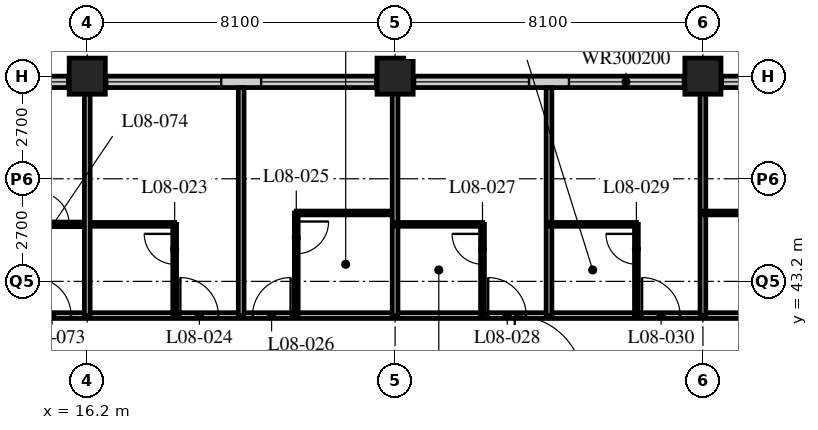
"""IFC4 building model, lengths in metres.
Left out: names, types, materials, properties, quantities, classifications, styles, units other than length and angle.
Written with IfcOpenShell. Run it as: python <this file> out.ifc"""

import sys

from ifc_helpers import new_model, si_unit, direction, frame, frame_2d, origin, origin_2d, place, context, subcontext, project, spatial, rectangle, hollow_rectangle, extrude, element, fill, save


model = new_model("IFC4")
c1 = context("Model", 3, precision=1e-05, world=origin(), true_north=direction((0.0, 1.0)))
c2 = subcontext(c1, "Body", "Model", "MODEL_VIEW")
j1 = project(units=[si_unit("LENGTHUNIT", "METRE"), si_unit("PLANEANGLEUNIT", "RADIAN")], contexts=[c1])
p1 = place(None, origin())
s1 = spatial("IfcSite", under=j1, at=p1, CompositionType="ELEMENT")
p2 = place(p1, origin())
s2 = spatial("IfcBuilding", under=s1, at=p2, CompositionType="ELEMENT")
p3 = place(p2, frame((0.0, 0.0, 39.8)))
s3 = spatial("IfcBuildingStorey", under=s2, at=p3, CompositionType="ELEMENT", Elevation=39.8)
for number, where, z_axis, x_axis in (
    (1, (16.2, 48.6, 0.0), (0.0, 0.0, 1.0), (1.0, 0.0, 0.0)),
    (2, (24.3, 48.6, 0.0), (0.0, 0.0, 1.0), (1.0, 0.0, 0.0)),
    (3, (32.4, 48.6, 0.0), (0.0, 0.0, 1.0), (1.0, 0.0, 0.0)),
):
    element("IfcColumn", number, at=place(p3, frame(where, z_axis=z_axis, x_axis=x_axis)), inside=s3, PredefinedType="COLUMN", context=c2, shape_type="SweptSolid", body=[
        extrude(hollow_rectangle(XDim=0.95, YDim=0.95, WallThickness=0.095, at=origin_2d()), origin(), (0.0, 0.0, 1.0), 3.4),
    ])
p4 = place(p3, frame((48.3, 48.45, 0.0), z_axis=(0.0, 0.0, 1.0), x_axis=(-1.0, 0.0, 0.0)))
e4 = element("IfcWall", 4, at=p4, inside=s3, PredefinedType="SOLIDWALL", context=c2, shape_type="SweptSolid", body=[
    extrude(rectangle(XDim=40.2, YDim=0.3, at=frame_2d((20.1, 0.0))), origin(), (0.0, 0.0, 1.0), 3.19),
])
p5 = place(p4, frame((0.225, 0.0, 0.9)))
e5 = element("IfcOpeningElement", 5, at=p5, cuts=e4, PredefinedType="OPENING", context=c2, shape_type="SweptSolid", body=[
    extrude(rectangle(XDim=3.0, YDim=2.0, at=frame_2d((1.5, 1.0))), frame((0.0, 0.16, 0.0), z_axis=(0.0, -1.0, 0.0), x_axis=(1.0, 0.0, 0.0)), (0.0, 0.0, 1.0), 0.32),
])
p6 = place(p4, frame((4.275, 0.0, 0.9)))
e6 = element("IfcOpeningElement", 6, at=p6, cuts=e4, PredefinedType="OPENING", context=c2, shape_type="SweptSolid", body=[
    extrude(rectangle(XDim=3.0, YDim=2.0, at=frame_2d((1.5, 1.0))), frame((0.0, 0.16, 0.0), z_axis=(0.0, -1.0, 0.0), x_axis=(1.0, 0.0, 0.0)), (0.0, 0.0, 1.0), 0.32),
])
p7 = place(p4, frame((8.325, 0.0, 0.9)))
e7 = element("IfcOpeningElement", 7, at=p7, cuts=e4, PredefinedType="OPENING", context=c2, shape_type="SweptSolid", body=[
    extrude(rectangle(XDim=3.0, YDim=2.0, at=frame_2d((1.5, 1.0))), frame((0.0, 0.16, 0.0), z_axis=(0.0, -1.0, 0.0), x_axis=(1.0, 0.0, 0.0)), (0.0, 0.0, 1.0), 0.32),
])
p8 = place(p4, frame((12.375, 0.0, 0.9)))
e8 = element("IfcOpeningElement", 8, at=p8, cuts=e4, PredefinedType="OPENING", context=c2, shape_type="SweptSolid", body=[
    extrude(rectangle(XDim=3.0, YDim=2.0, at=frame_2d((1.5, 1.0))), frame((0.0, 0.16, 0.0), z_axis=(0.0, -1.0, 0.0), x_axis=(1.0, 0.0, 0.0)), (0.0, 0.0, 1.0), 0.32),
])
p9 = place(p4, frame((16.425, 0.0, 0.9)))
e9 = element("IfcOpeningElement", 9, at=p9, cuts=e4, PredefinedType="OPENING", context=c2, shape_type="SweptSolid", body=[
    extrude(rectangle(XDim=3.0, YDim=2.0, at=frame_2d((1.5, 1.0))), frame((0.0, 0.16, 0.0), z_axis=(0.0, -1.0, 0.0), x_axis=(1.0, 0.0, 0.0)), (0.0, 0.0, 1.0), 0.32),
])
p10 = place(p4, frame((20.475, 0.0, 0.9)))
e10 = element("IfcOpeningElement", 10, at=p10, cuts=e4, PredefinedType="OPENING", context=c2, shape_type="SweptSolid", body=[
    extrude(rectangle(XDim=3.0, YDim=2.0, at=frame_2d((1.5, 1.0))), frame((0.0, 0.16, 0.0), z_axis=(0.0, -1.0, 0.0), x_axis=(1.0, 0.0, 0.0)), (0.0, 0.0, 1.0), 0.32),
])
p11 = place(p4, frame((24.525, 0.0, 0.9)))
e11 = element("IfcOpeningElement", 11, at=p11, cuts=e4, PredefinedType="OPENING", context=c2, shape_type="SweptSolid", body=[
    extrude(rectangle(XDim=3.0, YDim=2.0, at=frame_2d((1.5, 1.0))), frame((0.0, 0.16, 0.0), z_axis=(0.0, -1.0, 0.0), x_axis=(1.0, 0.0, 0.0)), (0.0, 0.0, 1.0), 0.32),
])
p12 = place(p4, frame((28.575, 0.0, 0.9)))
e12 = element("IfcOpeningElement", 12, at=p12, cuts=e4, PredefinedType="OPENING", context=c2, shape_type="SweptSolid", body=[
    extrude(rectangle(XDim=3.0, YDim=2.0, at=frame_2d((1.5, 1.0))), frame((0.0, 0.16, 0.0), z_axis=(0.0, -1.0, 0.0), x_axis=(1.0, 0.0, 0.0)), (0.0, 0.0, 1.0), 0.32),
])
p13 = place(p4, frame((32.625, 0.0, 0.9)))
e13 = element("IfcOpeningElement", 13, at=p13, cuts=e4, PredefinedType="OPENING", context=c2, shape_type="SweptSolid", body=[
    extrude(rectangle(XDim=3.0, YDim=2.0, at=frame_2d((1.5, 1.0))), frame((0.0, 0.16, 0.0), z_axis=(0.0, -1.0, 0.0), x_axis=(1.0, 0.0, 0.0)), (0.0, 0.0, 1.0), 0.32),
])
p14 = place(p4, frame((36.675, 0.0, 0.9)))
e14 = element("IfcOpeningElement", 14, at=p14, cuts=e4, PredefinedType="OPENING", context=c2, shape_type="SweptSolid", body=[
    extrude(rectangle(XDim=3.0, YDim=2.0, at=frame_2d((1.5, 1.0))), frame((0.0, 0.16, 0.0), z_axis=(0.0, -1.0, 0.0), x_axis=(1.0, 0.0, 0.0)), (0.0, 0.0, 1.0), 0.32),
])
p15 = place(p3, frame((12.15, 42.3, 0.0), z_axis=(0.0, 0.0, 1.0), x_axis=(1.0, 0.0, 0.0)))
e15 = element("IfcWall", 15, at=p15, inside=s3, PredefinedType="PARTITIONING", context=c2, shape_type="SweptSolid", body=[
    extrude(rectangle(XDim=32.4, YDim=0.15, at=frame_2d((16.2, 0.0))), origin(), (0.0, 0.0, 1.0), 3.19),
])
p16 = place(p15, frame((6.5, 0.0, 0.0)))
e16 = element("IfcOpeningElement", 16, at=p16, cuts=e15, PredefinedType="OPENING", context=c2, shape_type="SweptSolid", body=[
    extrude(rectangle(XDim=1.0, YDim=2.1, at=frame_2d((0.5, 1.05))), frame((0.0, 0.085, 0.0), z_axis=(0.0, -1.0, 0.0), x_axis=(1.0, 0.0, 0.0)), (0.0, 0.0, 1.0), 0.17),
])
p17 = place(p15, frame((8.4, 0.0, 0.0)))
e17 = element("IfcOpeningElement", 17, at=p17, cuts=e15, PredefinedType="OPENING", context=c2, shape_type="SweptSolid", body=[
    extrude(rectangle(XDim=1.0, YDim=2.1, at=frame_2d((0.5, 1.05))), frame((0.0, 0.085, 0.0), z_axis=(0.0, -1.0, 0.0), x_axis=(1.0, 0.0, 0.0)), (0.0, 0.0, 1.0), 0.17),
])
p18 = place(p15, frame((14.6, 0.0, 0.0)))
e18 = element("IfcOpeningElement", 18, at=p18, cuts=e15, PredefinedType="OPENING", context=c2, shape_type="SweptSolid", body=[
    extrude(rectangle(XDim=1.0, YDim=2.1, at=frame_2d((0.5, 1.05))), frame((0.0, 0.085, 0.0), z_axis=(0.0, -1.0, 0.0), x_axis=(1.0, 0.0, 0.0)), (0.0, 0.0, 1.0), 0.17),
])
p19 = place(p15, frame((18.65, 0.0, 0.0)))
e19 = element("IfcOpeningElement", 19, at=p19, cuts=e15, PredefinedType="OPENING", context=c2, shape_type="SweptSolid", body=[
    extrude(rectangle(XDim=1.0, YDim=2.1, at=frame_2d((0.5, 1.05))), frame((0.0, 0.085, 0.0), z_axis=(0.0, -1.0, 0.0), x_axis=(1.0, 0.0, 0.0)), (0.0, 0.0, 1.0), 0.17),
])
p20 = place(p15, frame((23.0, 0.0, 0.0)))
e20 = element("IfcOpeningElement", 20, at=p20, cuts=e15, PredefinedType="OPENING", context=c2, shape_type="SweptSolid", body=[
    extrude(rectangle(XDim=1.0, YDim=2.1, at=frame_2d((0.5, 1.05))), frame((0.0, 0.085, 0.0), z_axis=(0.0, -1.0, 0.0), x_axis=(1.0, 0.0, 0.0)), (0.0, 0.0, 1.0), 0.17),
])
p21 = place(p15, frame((26.75, 0.0, 0.0)))
e21 = element("IfcOpeningElement", 21, at=p21, cuts=e15, PredefinedType="OPENING", context=c2, shape_type="SweptSolid", body=[
    extrude(rectangle(XDim=1.0, YDim=2.1, at=frame_2d((0.5, 1.05))), frame((0.0, 0.085, 0.0), z_axis=(0.0, -1.0, 0.0), x_axis=(1.0, 0.0, 0.0)), (0.0, 0.0, 1.0), 0.17),
])
p22 = place(p15, frame((28.775, 0.0, 0.0)))
e22 = element("IfcOpeningElement", 22, at=p22, cuts=e15, PredefinedType="OPENING", context=c2, shape_type="SweptSolid", body=[
    extrude(rectangle(XDim=1.0, YDim=2.1, at=frame_2d((0.5, 1.05))), frame((0.0, 0.085, 0.0), z_axis=(0.0, -1.0, 0.0), x_axis=(1.0, 0.0, 0.0)), (0.0, 0.0, 1.0), 0.17),
])
p23 = place(p15, frame((2.625, 0.0, 0.0)))
e23 = element("IfcOpeningElement", 23, at=p23, cuts=e15, PredefinedType="OPENING", context=c2, shape_type="SweptSolid", body=[
    extrude(rectangle(XDim=1.0, YDim=2.1, at=frame_2d((0.5, 1.05))), frame((0.0, 0.085, 0.0), z_axis=(0.0, -1.0, 0.0), x_axis=(1.0, 0.0, 0.0)), (0.0, 0.0, 1.0), 0.17),
])
p24 = place(p3, frame((16.2, 44.7, 0.0), z_axis=(0.0, 0.0, 1.0), x_axis=(1.0, 0.0, 0.0)))
e24 = element("IfcWall", 24, at=p24, inside=s3, PredefinedType="PARTITIONING", context=c2, shape_type="SweptSolid", body=[
    extrude(rectangle(XDim=2.3, YDim=0.1, at=frame_2d((1.15, 0.0))), origin(), (0.0, 0.0, 1.0), 3.19),
])
p25 = place(p3, frame((18.5, 42.3, 0.0), z_axis=(0.0, 0.0, 1.0), x_axis=(0.0, 1.0, 0.0)))
e25 = element("IfcWall", 25, at=p25, inside=s3, PredefinedType="PARTITIONING", context=c2, shape_type="SweptSolid", body=[
    extrude(rectangle(XDim=2.4, YDim=0.1, at=frame_2d((1.2, 0.0))), origin(), (0.0, 0.0, 1.0), 3.19),
])
p26 = place(p25, frame((1.35, 0.0, 0.0)))
e26 = element("IfcOpeningElement", 26, at=p26, cuts=e25, PredefinedType="OPENING", context=c2, shape_type="SweptSolid", body=[
    extrude(rectangle(XDim=0.8, YDim=2.1, at=frame_2d((0.4, 1.05))), frame((0.0, 0.06, 0.0), z_axis=(0.0, -1.0, 0.0), x_axis=(1.0, 0.0, 0.0)), (0.0, 0.0, 1.0), 0.12),
])
p27 = place(p3, frame((20.25, 42.3, 0.0), z_axis=(0.0, 0.0, 1.0), x_axis=(0.0, 1.0, 0.0)))
e27 = element("IfcWall", 27, at=p27, inside=s3, PredefinedType="PARTITIONING", context=c2, shape_type="SweptSolid", body=[
    extrude(rectangle(XDim=6.0, YDim=0.15, at=frame_2d((3.0, 0.0))), origin(), (0.0, 0.0, 1.0), 3.19),
])
p28 = place(p3, frame((21.7, 45.0, 0.0), z_axis=(0.0, 0.0, 1.0), x_axis=(1.0, 0.0, 0.0)))
e28 = element("IfcWall", 28, at=p28, inside=s3, PredefinedType="PARTITIONING", context=c2, shape_type="SweptSolid", body=[
    extrude(rectangle(XDim=2.6, YDim=0.1, at=frame_2d((1.3, 0.0))), origin(), (0.0, 0.0, 1.0), 3.19),
])
p29 = place(p3, frame((21.7, 42.3, 0.0), z_axis=(0.0, 0.0, 1.0), x_axis=(0.0, 1.0, 0.0)))
e29 = element("IfcWall", 29, at=p29, inside=s3, PredefinedType="PARTITIONING", context=c2, shape_type="SweptSolid", body=[
    extrude(rectangle(XDim=2.7, YDim=0.1, at=frame_2d((1.35, 0.0))), origin(), (0.0, 0.0, 1.0), 3.19),
])
p30 = place(p29, frame((1.625, 0.0, 0.0)))
e30 = element("IfcOpeningElement", 30, at=p30, cuts=e29, PredefinedType="OPENING", context=c2, shape_type="SweptSolid", body=[
    extrude(rectangle(XDim=0.85, YDim=2.1, at=frame_2d((0.425, 1.05))), frame((0.0, 0.06, 0.0), z_axis=(0.0, -1.0, 0.0), x_axis=(1.0, 0.0, 0.0)), (0.0, 0.0, 1.0), 0.12),
])
p31 = place(p3, frame((24.3, 42.3, 0.0), z_axis=(0.0, 0.0, 1.0), x_axis=(0.0, 1.0, 0.0)))
e31 = element("IfcWall", 31, at=p31, inside=s3, PredefinedType="PARTITIONING", context=c2, shape_type="SweptSolid", body=[
    extrude(rectangle(XDim=6.0, YDim=0.15, at=frame_2d((3.0, 0.0))), origin(), (0.0, 0.0, 1.0), 2.578),
])
p32 = place(p3, frame((24.3, 44.7, 0.0), z_axis=(0.0, 0.0, 1.0), x_axis=(1.0, 0.0, 0.0)))
e32 = element("IfcWall", 32, at=p32, inside=s3, PredefinedType="PARTITIONING", context=c2, shape_type="SweptSolid", body=[
    extrude(rectangle(XDim=2.3, YDim=0.1, at=frame_2d((1.15, 0.0))), origin(), (0.0, 0.0, 1.0), 3.19),
])
p33 = place(p3, frame((26.6, 42.3, 0.0), z_axis=(0.0, 0.0, 1.0), x_axis=(0.0, 1.0, 0.0)))
e33 = element("IfcWall", 33, at=p33, inside=s3, PredefinedType="PARTITIONING", context=c2, shape_type="SweptSolid", body=[
    extrude(rectangle(XDim=2.4, YDim=0.1, at=frame_2d((1.2, 0.0))), origin(), (0.0, 0.0, 1.0), 3.19),
])
p34 = place(p33, frame((1.35, 0.0, 0.0)))
e34 = element("IfcOpeningElement", 34, at=p34, cuts=e33, PredefinedType="OPENING", context=c2, shape_type="SweptSolid", body=[
    extrude(rectangle(XDim=0.8, YDim=2.1, at=frame_2d((0.4, 1.05))), frame((0.0, 0.06, 0.0), z_axis=(0.0, -1.0, 0.0), x_axis=(1.0, 0.0, 0.0)), (0.0, 0.0, 1.0), 0.12),
])
p35 = place(p3, frame((28.35, 42.3, 0.0), z_axis=(0.0, 0.0, 1.0), x_axis=(0.0, 1.0, 0.0)))
e35 = element("IfcWall", 35, at=p35, inside=s3, PredefinedType="PARTITIONING", context=c2, shape_type="SweptSolid", body=[
    extrude(rectangle(XDim=6.0, YDim=0.15, at=frame_2d((3.0, 0.0))), origin(), (0.0, 0.0, 1.0), 3.19),
])
p36 = place(p3, frame((28.35, 44.7, 0.0), z_axis=(0.0, 0.0, 1.0), x_axis=(1.0, 0.0, 0.0)))
e36 = element("IfcWall", 36, at=p36, inside=s3, PredefinedType="PARTITIONING", context=c2, shape_type="SweptSolid", body=[
    extrude(rectangle(XDim=2.3, YDim=0.1, at=frame_2d((1.15, 0.0))), origin(), (0.0, 0.0, 1.0), 3.19),
])
p37 = place(p3, frame((30.65, 42.3, 0.0), z_axis=(0.0, 0.0, 1.0), x_axis=(0.0, 1.0, 0.0)))
e37 = element("IfcWall", 37, at=p37, inside=s3, PredefinedType="PARTITIONING", context=c2, shape_type="SweptSolid", body=[
    extrude(rectangle(XDim=2.4, YDim=0.1, at=frame_2d((1.2, 0.0))), origin(), (0.0, 0.0, 1.0), 3.19),
])
p38 = place(p37, frame((1.35, 0.0, 0.0)))
e38 = element("IfcOpeningElement", 38, at=p38, cuts=e37, PredefinedType="OPENING", context=c2, shape_type="SweptSolid", body=[
    extrude(rectangle(XDim=0.8, YDim=2.1, at=frame_2d((0.4, 1.05))), frame((0.0, 0.06, 0.0), z_axis=(0.0, -1.0, 0.0), x_axis=(1.0, 0.0, 0.0)), (0.0, 0.0, 1.0), 0.12),
])
p39 = place(p3, frame((32.4, 42.3, 0.0), z_axis=(0.0, 0.0, 1.0), x_axis=(0.0, 1.0, 0.0)))
e39 = element("IfcWall", 39, at=p39, inside=s3, PredefinedType="PARTITIONING", context=c2, shape_type="SweptSolid", body=[
    extrude(rectangle(XDim=6.0, YDim=0.15, at=frame_2d((3.0, 0.0))), origin(), (0.0, 0.0, 1.0), 2.578),
])
p40 = place(p3, frame((32.4, 45.0, 0.0), z_axis=(0.0, 0.0, 1.0), x_axis=(1.0, 0.0, 0.0)))
e40 = element("IfcWall", 40, at=p40, inside=s3, PredefinedType="PARTITIONING", context=c2, shape_type="SweptSolid", body=[
    extrude(rectangle(XDim=2.6, YDim=0.1, at=frame_2d((1.3, 0.0))), origin(), (0.0, 0.0, 1.0), 3.19),
])
p41 = place(p3, frame((12.15, 44.7, 0.0), z_axis=(0.0, 0.0, 1.0), x_axis=(1.0, 0.0, 0.0)))
e41 = element("IfcWall", 41, at=p41, inside=s3, PredefinedType="PARTITIONING", context=c2, shape_type="SweptSolid", body=[
    extrude(rectangle(XDim=4.05, YDim=0.12, at=frame_2d((2.025, 0.0))), origin(), (0.0, 0.0, 1.0), 3.19),
])
p42 = place(p41, frame((2.725, 0.0, 0.0)))
e42 = element("IfcOpeningElement", 42, at=p42, cuts=e41, PredefinedType="OPENING", context=c2, shape_type="SweptSolid", body=[
    extrude(rectangle(XDim=0.85, YDim=2.1, at=frame_2d((0.425, 1.05))), frame((0.0, 0.07, 0.0), z_axis=(0.0, -1.0, 0.0), x_axis=(1.0, 0.0, 0.0)), (0.0, 0.0, 1.0), 0.14),
])
p43 = place(p3, frame((16.2, 42.3, 0.0), z_axis=(0.0, 0.0, 1.0), x_axis=(0.0, 1.0, 0.0)))
e43 = element("IfcWall", 43, at=p43, inside=s3, PredefinedType="PARTITIONING", context=c2, shape_type="SweptSolid", body=[
    extrude(rectangle(XDim=6.0, YDim=0.15, at=frame_2d((3.0, 0.0))), origin(), (0.0, 0.0, 1.0), 2.578),
])
p44 = place(p8, origin())
e44 = element("IfcWindow", 44, at=p44, inside=s3, PartitioningType="SINGLE_PANEL", PredefinedType="WINDOW", context=c2, shape_type="SweptSolid", body=[
    extrude(rectangle(XDim=3.0, YDim=2.0, at=frame_2d((1.5, 1.0))), frame((0.0, 0.03, 0.0), z_axis=(0.0, -1.0, 0.0), x_axis=(1.0, 0.0, 0.0)), (0.0, 0.0, 1.0), 0.06),
])
fill(e8, e44)
p45 = place(p9, origin())
e45 = element("IfcWindow", 45, at=p45, inside=s3, PartitioningType="SINGLE_PANEL", PredefinedType="WINDOW", context=c2, shape_type="SweptSolid", body=[
    extrude(rectangle(XDim=3.0, YDim=2.0, at=frame_2d((1.5, 1.0))), frame((0.0, 0.03, 0.0), z_axis=(0.0, -1.0, 0.0), x_axis=(1.0, 0.0, 0.0)), (0.0, 0.0, 1.0), 0.06),
])
fill(e9, e45)
p46 = place(p10, origin())
e46 = element("IfcWindow", 46, at=p46, inside=s3, PartitioningType="SINGLE_PANEL", PredefinedType="WINDOW", context=c2, shape_type="SweptSolid", body=[
    extrude(rectangle(XDim=3.0, YDim=2.0, at=frame_2d((1.5, 1.0))), frame((0.0, 0.03, 0.0), z_axis=(0.0, -1.0, 0.0), x_axis=(1.0, 0.0, 0.0)), (0.0, 0.0, 1.0), 0.06),
])
fill(e10, e46)
p47 = place(p11, origin())
e47 = element("IfcWindow", 47, at=p47, inside=s3, PartitioningType="SINGLE_PANEL", PredefinedType="WINDOW", context=c2, shape_type="SweptSolid", body=[
    extrude(rectangle(XDim=3.0, YDim=2.0, at=frame_2d((1.5, 1.0))), frame((0.0, 0.03, 0.0), z_axis=(0.0, -1.0, 0.0), x_axis=(1.0, 0.0, 0.0)), (0.0, 0.0, 1.0), 0.06),
])
fill(e11, e47)
p48 = place(p12, origin())
e48 = element("IfcWindow", 48, at=p48, inside=s3, PartitioningType="SINGLE_PANEL", PredefinedType="WINDOW", context=c2, shape_type="SweptSolid", body=[
    extrude(rectangle(XDim=3.0, YDim=2.0, at=frame_2d((1.5, 1.0))), frame((0.0, 0.03, 0.0), z_axis=(0.0, -1.0, 0.0), x_axis=(1.0, 0.0, 0.0)), (0.0, 0.0, 1.0), 0.06),
])
fill(e12, e48)
p49 = place(p13, origin())
e49 = element("IfcWindow", 49, at=p49, inside=s3, PartitioningType="SINGLE_PANEL", PredefinedType="WINDOW", context=c2, shape_type="SweptSolid", body=[
    extrude(rectangle(XDim=3.0, YDim=2.0, at=frame_2d((1.5, 1.0))), frame((0.0, 0.03, 0.0), z_axis=(0.0, -1.0, 0.0), x_axis=(1.0, 0.0, 0.0)), (0.0, 0.0, 1.0), 0.06),
])
fill(e13, e49)
p50 = place(p26, origin())
e50 = element("IfcDoor", 50, at=p50, inside=s3, OperationType="SINGLE_SWING_RIGHT", PredefinedType="DOOR", context=c2, shape_type="SweptSolid", body=[
    extrude(rectangle(XDim=0.8, YDim=2.1, at=frame_2d((0.4, 1.05))), frame((0.0, 0.025, 0.0), z_axis=(0.0, -1.0, 0.0), x_axis=(1.0, 0.0, 0.0)), (0.0, 0.0, 1.0), 0.05),
])
fill(e26, e50)
p51 = place(p16, origin())
e51 = element("IfcDoor", 51, at=p51, inside=s3, OperationType="SINGLE_SWING_LEFT", PredefinedType="DOOR", context=c2, shape_type="SweptSolid", body=[
    extrude(rectangle(XDim=1.0, YDim=2.1, at=frame_2d((0.5, 1.05))), frame((0.0, 0.025, 0.0), z_axis=(0.0, -1.0, 0.0), x_axis=(1.0, 0.0, 0.0)), (0.0, 0.0, 1.0), 0.05),
])
fill(e16, e51)
p52 = place(p30, origin())
e52 = element("IfcDoor", 52, at=p52, inside=s3, OperationType="SINGLE_SWING_LEFT", PredefinedType="DOOR", context=c2, shape_type="SweptSolid", body=[
    extrude(rectangle(XDim=0.85, YDim=2.1, at=frame_2d((0.425, 1.05))), frame((0.0, 0.025, 0.0), z_axis=(0.0, -1.0, 0.0), x_axis=(1.0, 0.0, 0.0)), (0.0, 0.0, 1.0), 0.05),
])
fill(e30, e52)
p53 = place(p17, origin())
e53 = element("IfcDoor", 53, at=p53, inside=s3, OperationType="SINGLE_SWING_RIGHT", PredefinedType="DOOR", context=c2, shape_type="SweptSolid", body=[
    extrude(rectangle(XDim=1.0, YDim=2.1, at=frame_2d((0.5, 1.05))), frame((0.0, 0.025, 0.0), z_axis=(0.0, -1.0, 0.0), x_axis=(1.0, 0.0, 0.0)), (0.0, 0.0, 1.0), 0.05),
])
fill(e17, e53)
p54 = place(p34, origin())
e54 = element("IfcDoor", 54, at=p54, inside=s3, OperationType="SINGLE_SWING_RIGHT", PredefinedType="DOOR", context=c2, shape_type="SweptSolid", body=[
    extrude(rectangle(XDim=0.8, YDim=2.1, at=frame_2d((0.4, 1.05))), frame((0.0, 0.025, 0.0), z_axis=(0.0, -1.0, 0.0), x_axis=(1.0, 0.0, 0.0)), (0.0, 0.0, 1.0), 0.05),
])
fill(e34, e54)
p55 = place(p18, origin())
e55 = element("IfcDoor", 55, at=p55, inside=s3, OperationType="SINGLE_SWING_LEFT", PredefinedType="DOOR", context=c2, shape_type="SweptSolid", body=[
    extrude(rectangle(XDim=1.0, YDim=2.1, at=frame_2d((0.5, 1.05))), frame((0.0, 0.025, 0.0), z_axis=(0.0, -1.0, 0.0), x_axis=(1.0, 0.0, 0.0)), (0.0, 0.0, 1.0), 0.05),
])
fill(e18, e55)
p56 = place(p38, origin())
e56 = element("IfcDoor", 56, at=p56, inside=s3, OperationType="SINGLE_SWING_RIGHT", PredefinedType="DOOR", context=c2, shape_type="SweptSolid", body=[
    extrude(rectangle(XDim=0.8, YDim=2.1, at=frame_2d((0.4, 1.05))), frame((0.0, 0.025, 0.0), z_axis=(0.0, -1.0, 0.0), x_axis=(1.0, 0.0, 0.0)), (0.0, 0.0, 1.0), 0.05),
])
fill(e38, e56)
p57 = place(p19, origin())
e57 = element("IfcDoor", 57, at=p57, inside=s3, OperationType="SINGLE_SWING_LEFT", PredefinedType="DOOR", context=c2, shape_type="SweptSolid", body=[
    extrude(rectangle(XDim=1.0, YDim=2.1, at=frame_2d((0.5, 1.05))), frame((0.0, 0.025, 0.0), z_axis=(0.0, -1.0, 0.0), x_axis=(1.0, 0.0, 0.0)), (0.0, 0.0, 1.0), 0.05),
])
fill(e19, e57)
p58 = place(p23, origin())
e58 = element("IfcDoor", 58, at=p58, inside=s3, OperationType="SINGLE_SWING_LEFT", PredefinedType="DOOR", context=c2, shape_type="SweptSolid", body=[
    extrude(rectangle(XDim=1.0, YDim=2.1, at=frame_2d((0.5, 1.05))), frame((0.0, 0.025, 0.0), z_axis=(0.0, -1.0, 0.0), x_axis=(1.0, 0.0, 0.0)), (0.0, 0.0, 1.0), 0.05),
])
fill(e23, e58)
p59 = place(p42, origin())
e59 = element("IfcDoor", 59, at=p59, inside=s3, OperationType="SINGLE_SWING_LEFT", PredefinedType="DOOR", context=c2, shape_type="SweptSolid", body=[
    extrude(rectangle(XDim=0.85, YDim=2.1, at=frame_2d((0.425, 1.05))), frame((0.0, 0.025, 0.0), z_axis=(0.0, -1.0, 0.0), x_axis=(1.0, 0.0, 0.0)), (0.0, 0.0, 1.0), 0.05),
])
fill(e42, e59)
save(model, sys.argv[1])
